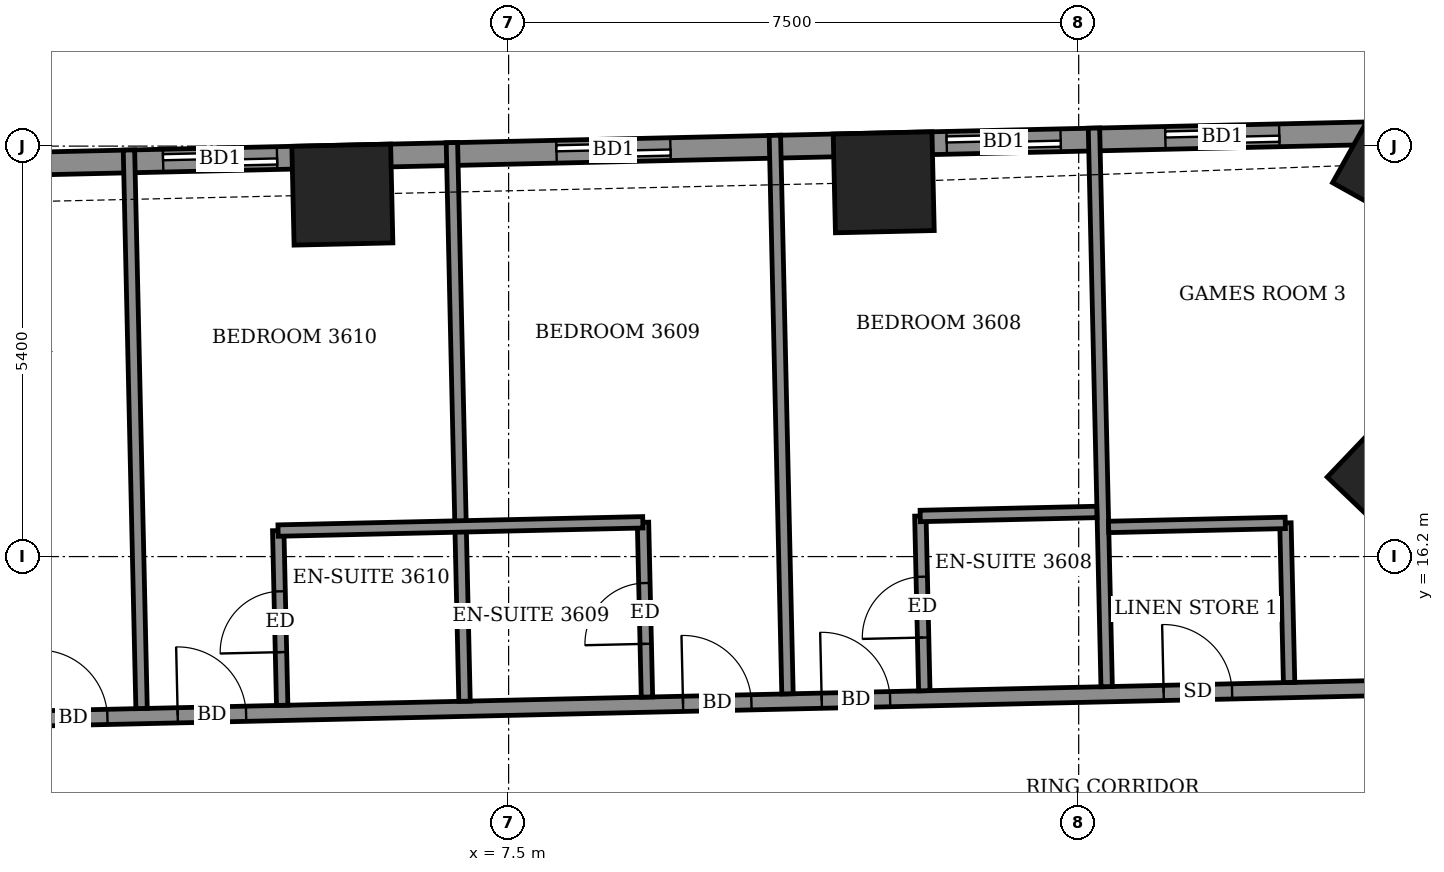
"""IFC4 building model, lengths in metres.
Left out: names, types, materials, properties, quantities, classifications, styles, units other than length and angle.
Written with IfcOpenShell. Run it as: python <this file> out.ifc"""

import sys

from ifc_helpers import new_model, si_unit, direction, frame, frame_2d, origin, origin_2d, place, context, subcontext, project, spatial, rectangle, extrude, element, fill, save


model = new_model("IFC4")
c1 = context("Model", 3, precision=1e-05, world=origin(), true_north=direction((0.0, 1.0)))
c2 = subcontext(c1, "Body", "Model", "MODEL_VIEW")
j1 = project(units=[si_unit("LENGTHUNIT", "METRE"), si_unit("PLANEANGLEUNIT", "RADIAN")], contexts=[c1])
p1 = place(None, origin())
s1 = spatial("IfcSite", under=j1, at=p1, CompositionType="ELEMENT")
p2 = place(p1, origin())
s2 = spatial("IfcBuilding", under=s1, at=p2, CompositionType="ELEMENT")
p3 = place(p2, frame((0.0, 0.0, 144.5)))
s3 = spatial("IfcBuildingStorey", under=s2, at=p3, CompositionType="ELEMENT", Elevation=144.5)
for number, where, z_axis, x_axis in (
    (1, (19.189, 17.267, -0.55), (0.0, 0.0, 1.0), (-0.723, 0.691, 0.0)),
    (2, (19.225, 21.369, -0.55), (0.0, 0.0, 1.0), (-0.873, 0.488, 0.0)),
    (3, (12.435, 21.124, -0.55), (0.0, 0.0, 1.0), (-1.0, -0.023, 0.0)),
    (4, (5.313, 20.962, -0.55), (0.0, 0.0, 1.0), (-1.0, -0.023, 0.0)),
):
    element("IfcColumn", number, at=place(p3, frame(where, z_axis=z_axis, x_axis=x_axis)), inside=s3, PredefinedType="COLUMN", context=c2, shape_type="SweptSolid", body=[
        extrude(rectangle(XDim=1.3, YDim=1.3, at=origin_2d()), origin(), (0.0, 0.0, 1.0), 3.6),
    ])
p4 = place(p3, frame((19.396, 21.782, 0.0), z_axis=(0.0, 0.0, 1.0), x_axis=(-0.999742636707, -0.022686126826, 0.0)))
e5 = element("IfcWall", 5, at=p4, inside=s3, PredefinedType="SOLIDWALL", context=c2, shape_type="SweptSolid", body=[
    extrude(rectangle(XDim=42.444, YDim=0.3, at=frame_2d((21.222, 0.0))), origin(), (0.0, 0.0, 1.0), 3.05),
])
p5 = place(p4, frame((1.757, 0.0, 0.0)))
e6 = element("IfcOpeningElement", 6, at=p5, cuts=e5, PredefinedType="OPENING", context=c2, shape_type="SweptSolid", body=[
    extrude(rectangle(XDim=1.5, YDim=2.4, at=frame_2d((0.75, 1.2))), frame((0.0, 0.16, 0.0), z_axis=(0.0, -1.0, 0.0), x_axis=(1.0, 0.0, 0.0)), (0.0, 0.0, 1.0), 0.32),
])
p6 = place(p4, frame((4.634, 0.0, 0.0)))
e7 = element("IfcOpeningElement", 7, at=p6, cuts=e5, PredefinedType="OPENING", context=c2, shape_type="SweptSolid", body=[
    extrude(rectangle(XDim=1.5, YDim=2.4, at=frame_2d((0.75, 1.2))), frame((0.0, 0.16, 0.0), z_axis=(0.0, -1.0, 0.0), x_axis=(1.0, 0.0, 0.0)), (0.0, 0.0, 1.0), 0.32),
])
p7 = place(p4, frame((9.769, 0.0, 0.0)))
e8 = element("IfcOpeningElement", 8, at=p7, cuts=e5, PredefinedType="OPENING", context=c2, shape_type="SweptSolid", body=[
    extrude(rectangle(XDim=1.5, YDim=2.4, at=frame_2d((0.75, 1.2))), frame((0.0, 0.16, 0.0), z_axis=(0.0, -1.0, 0.0), x_axis=(1.0, 0.0, 0.0)), (0.0, 0.0, 1.0), 0.32),
])
p8 = place(p4, frame((14.946, 0.0, 0.0)))
e9 = element("IfcOpeningElement", 9, at=p8, cuts=e5, PredefinedType="OPENING", context=c2, shape_type="SweptSolid", body=[
    extrude(rectangle(XDim=1.5, YDim=2.4, at=frame_2d((0.75, 1.2))), frame((0.0, 0.16, 0.0), z_axis=(0.0, -1.0, 0.0), x_axis=(1.0, 0.0, 0.0)), (0.0, 0.0, 1.0), 0.32),
])
p9 = place(p4, frame((18.108, 0.0, 0.0)))
e10 = element("IfcOpeningElement", 10, at=p9, cuts=e5, PredefinedType="OPENING", context=c2, shape_type="SweptSolid", body=[
    extrude(rectangle(XDim=1.5, YDim=2.4, at=frame_2d((0.75, 1.2))), frame((0.0, 0.16, 0.0), z_axis=(0.0, -1.0, 0.0), x_axis=(1.0, 0.0, 0.0)), (0.0, 0.0, 1.0), 0.32),
])
p10 = place(p4, frame((22.733, 0.0, 0.0)))
e11 = element("IfcOpeningElement", 11, at=p10, cuts=e5, PredefinedType="OPENING", context=c2, shape_type="SweptSolid", body=[
    extrude(rectangle(XDim=1.5, YDim=2.4, at=frame_2d((0.75, 1.2))), frame((0.0, 0.16, 0.0), z_axis=(0.0, -1.0, 0.0), x_axis=(1.0, 0.0, 0.0)), (0.0, 0.0, 1.0), 0.32),
])
p11 = place(p4, frame((25.895, 0.0, 0.0)))
e12 = element("IfcOpeningElement", 12, at=p11, cuts=e5, PredefinedType="OPENING", context=c2, shape_type="SweptSolid", body=[
    extrude(rectangle(XDim=1.5, YDim=2.4, at=frame_2d((0.75, 1.2))), frame((0.0, 0.16, 0.0), z_axis=(0.0, -1.0, 0.0), x_axis=(1.0, 0.0, 0.0)), (0.0, 0.0, 1.0), 0.32),
])
p12 = place(p4, frame((30.944, 0.0, 0.0)))
e13 = element("IfcOpeningElement", 13, at=p12, cuts=e5, PredefinedType="OPENING", context=c2, shape_type="SweptSolid", body=[
    extrude(rectangle(XDim=1.5, YDim=2.4, at=frame_2d((0.75, 1.2))), frame((0.0, 0.16, 0.0), z_axis=(0.0, -1.0, 0.0), x_axis=(1.0, 0.0, 0.0)), (0.0, 0.0, 1.0), 0.32),
])
p13 = place(p4, frame((36.232, 0.0, 0.0)))
e14 = element("IfcOpeningElement", 14, at=p13, cuts=e5, PredefinedType="OPENING", context=c2, shape_type="SweptSolid", body=[
    extrude(rectangle(XDim=1.5, YDim=2.4, at=frame_2d((0.75, 1.2))), frame((0.0, 0.16, 0.0), z_axis=(0.0, -1.0, 0.0), x_axis=(1.0, 0.0, 0.0)), (0.0, 0.0, 1.0), 0.32),
])
p14 = place(p4, frame((38.612, 0.0, 0.9)))
e15 = element("IfcOpeningElement", 15, at=p14, cuts=e5, PredefinedType="OPENING", context=c2, shape_type="SweptSolid", body=[
    extrude(rectangle(XDim=2.4, YDim=1.5, at=frame_2d((1.2, 0.75))), frame((0.0, 0.16, 0.0), z_axis=(0.0, -1.0, 0.0), x_axis=(1.0, 0.0, 0.0)), (0.0, 0.0, 1.0), 0.32),
])
p15 = place(p3, frame((16.679, 12.918, 0.0), z_axis=(0.0, 0.0, 1.0), x_axis=(0.999739057042, 0.022843332181, 0.0)))
e16 = element("IfcWall", 16, at=p15, inside=s3, PredefinedType="PARTITIONING", context=c2, shape_type="SweptSolid", body=[
    extrude(rectangle(XDim=5.867, YDim=0.2, at=frame_2d((2.934, 0.0))), origin(), (0.0, 0.0, 1.0), 3.05),
])
p16 = place(p15, frame((3.134, 0.0, 0.0)))
e17 = element("IfcOpeningElement", 17, at=p16, cuts=e16, PredefinedType="OPENING", context=c2, shape_type="SweptSolid", body=[
    extrude(rectangle(XDim=1.0, YDim=2.1, at=frame_2d((0.5, 1.05))), frame((0.0, 0.11, 0.0), z_axis=(0.0, -1.0, 0.0), x_axis=(1.0, 0.0, 0.0)), (0.0, 0.0, 1.0), 0.22),
])
p17 = place(p3, frame((-26.421, 13.441, 0.0), z_axis=(0.0, 0.0, 1.0), x_axis=(0.999742754064, 0.022680954485, 0.0)))
e18 = element("IfcWall", 18, at=p17, inside=s3, PredefinedType="PARTITIONING", context=c2, shape_type="SweptSolid", body=[
    extrude(rectangle(XDim=48.945, YDim=0.2, at=frame_2d((24.472, 0.0))), origin(), (0.0, 0.0, 1.0), 3.05),
])
p18 = place(p17, frame((46.772, 0.0, 0.0)))
e19 = element("IfcOpeningElement", 19, at=p18, cuts=e18, PredefinedType="OPENING", context=c2, shape_type="SweptSolid", body=[
    extrude(rectangle(XDim=1.0, YDim=2.1, at=frame_2d((0.5, 1.05))), frame((0.0, 0.11, 0.0), z_axis=(0.0, -1.0, 0.0), x_axis=(1.0, 0.0, 0.0)), (0.0, 0.0, 1.0), 0.22),
])
p19 = place(p17, frame((42.55, 0.0, 0.0)))
e20 = element("IfcOpeningElement", 20, at=p19, cuts=e18, PredefinedType="OPENING", context=c2, shape_type="SweptSolid", body=[
    extrude(rectangle(XDim=0.9, YDim=2.1, at=frame_2d((0.45, 1.05))), frame((0.0, 0.11, 0.0), z_axis=(0.0, -1.0, 0.0), x_axis=(1.0, 0.0, 0.0)), (0.0, 0.0, 1.0), 0.22),
])
p20 = place(p17, frame((38.05, 0.0, 0.0)))
e21 = element("IfcOpeningElement", 21, at=p20, cuts=e18, PredefinedType="OPENING", context=c2, shape_type="SweptSolid", body=[
    extrude(rectangle(XDim=0.9, YDim=2.1, at=frame_2d((0.45, 1.05))), frame((0.0, 0.11, 0.0), z_axis=(0.0, -1.0, 0.0), x_axis=(1.0, 0.0, 0.0)), (0.0, 0.0, 1.0), 0.22),
])
p21 = place(p17, frame((36.225, 0.0, 0.0)))
e22 = element("IfcOpeningElement", 22, at=p21, cuts=e18, PredefinedType="OPENING", context=c2, shape_type="SweptSolid", body=[
    extrude(rectangle(XDim=0.9, YDim=2.1, at=frame_2d((0.45, 1.05))), frame((0.0, 0.11, 0.0), z_axis=(0.0, -1.0, 0.0), x_axis=(1.0, 0.0, 0.0)), (0.0, 0.0, 1.0), 0.22),
])
p22 = place(p17, frame((29.575, 0.0, 0.0)))
e23 = element("IfcOpeningElement", 23, at=p22, cuts=e18, PredefinedType="OPENING", context=c2, shape_type="SweptSolid", body=[
    extrude(rectangle(XDim=0.9, YDim=2.1, at=frame_2d((0.45, 1.05))), frame((0.0, 0.11, 0.0), z_axis=(0.0, -1.0, 0.0), x_axis=(1.0, 0.0, 0.0)), (0.0, 0.0, 1.0), 0.22),
])
p23 = place(p17, frame((27.75, 0.0, 0.0)))
e24 = element("IfcOpeningElement", 24, at=p23, cuts=e18, PredefinedType="OPENING", context=c2, shape_type="SweptSolid", body=[
    extrude(rectangle(XDim=0.9, YDim=2.1, at=frame_2d((0.45, 1.05))), frame((0.0, 0.11, 0.0), z_axis=(0.0, -1.0, 0.0), x_axis=(1.0, 0.0, 0.0)), (0.0, 0.0, 1.0), 0.22),
])
p24 = place(p17, frame((21.125, 0.0, 0.0)))
e25 = element("IfcOpeningElement", 25, at=p24, cuts=e18, PredefinedType="OPENING", context=c2, shape_type="SweptSolid", body=[
    extrude(rectangle(XDim=0.9, YDim=2.1, at=frame_2d((0.45, 1.05))), frame((0.0, 0.11, 0.0), z_axis=(0.0, -1.0, 0.0), x_axis=(1.0, 0.0, 0.0)), (0.0, 0.0, 1.0), 0.22),
])
p25 = place(p17, frame((19.275, 0.0, 0.0)))
e26 = element("IfcOpeningElement", 26, at=p25, cuts=e18, PredefinedType="OPENING", context=c2, shape_type="SweptSolid", body=[
    extrude(rectangle(XDim=0.9, YDim=2.1, at=frame_2d((0.45, 1.05))), frame((0.0, 0.11, 0.0), z_axis=(0.0, -1.0, 0.0), x_axis=(1.0, 0.0, 0.0)), (0.0, 0.0, 1.0), 0.22),
])
p26 = place(p17, frame((12.65, 0.0, 0.0)))
e27 = element("IfcOpeningElement", 27, at=p26, cuts=e18, PredefinedType="OPENING", context=c2, shape_type="SweptSolid", body=[
    extrude(rectangle(XDim=0.9, YDim=2.1, at=frame_2d((0.45, 1.05))), frame((0.0, 0.11, 0.0), z_axis=(0.0, -1.0, 0.0), x_axis=(1.0, 0.0, 0.0)), (0.0, 0.0, 1.0), 0.22),
])
p27 = place(p17, frame((10.8, 0.0, 0.0)))
e28 = element("IfcOpeningElement", 28, at=p27, cuts=e18, PredefinedType="OPENING", context=c2, shape_type="SweptSolid", body=[
    extrude(rectangle(XDim=0.9, YDim=2.1, at=frame_2d((0.45, 1.05))), frame((0.0, 0.11, 0.0), z_axis=(0.0, -1.0, 0.0), x_axis=(1.0, 0.0, 0.0)), (0.0, 0.0, 1.0), 0.22),
])
p28 = place(p17, frame((1.55, 0.0, 0.0)))
e29 = element("IfcOpeningElement", 29, at=p28, cuts=e18, PredefinedType="OPENING", context=c2, shape_type="SweptSolid", body=[
    extrude(rectangle(XDim=1.0, YDim=2.1, at=frame_2d((0.5, 1.05))), frame((0.0, 0.11, 0.0), z_axis=(0.0, -1.0, 0.0), x_axis=(1.0, 0.0, 0.0)), (0.0, 0.0, 1.0), 0.22),
])
p29 = place(p17, frame((6.25, 0.0, 0.0)))
e30 = element("IfcOpeningElement", 30, at=p29, cuts=e18, PredefinedType="OPENING", context=c2, shape_type="SweptSolid", body=[
    extrude(rectangle(XDim=0.9, YDim=2.1, at=frame_2d((0.45, 1.05))), frame((0.0, 0.11, 0.0), z_axis=(0.0, -1.0, 0.0), x_axis=(1.0, 0.0, 0.0)), (0.0, 0.0, 1.0), 0.22),
])
p30 = place(p3, frame((2.671, 14.201, 0.0), z_axis=(0.0, 0.0, 1.0), x_axis=(-0.022587099398, 0.999744878927, 0.0)))
e31 = element("IfcWall", 31, at=p30, inside=s3, PredefinedType="PARTITIONING", context=c2, shape_type="SweptSolid", body=[
    extrude(rectangle(XDim=7.35, YDim=0.15, at=frame_2d((3.675, 0.0))), origin(), (0.0, 0.0, 1.0), 2.55),
])
p31 = place(p3, frame((4.521, 14.243, 0.0), z_axis=(0.0, 0.0, 1.0), x_axis=(-0.022612884682, 0.999744296031, 0.0)))
e32 = element("IfcWall", 32, at=p31, inside=s3, PredefinedType="PARTITIONING", context=c2, shape_type="SweptSolid", body=[
    extrude(rectangle(XDim=2.3, YDim=0.15, at=frame_2d((1.15, 0.0))), origin(), (0.0, 0.0, 1.0), 3.05),
])
p32 = place(p31, frame((0.7, 0.0, 0.0)))
e33 = element("IfcOpeningElement", 33, at=p32, cuts=e32, PredefinedType="OPENING", context=c2, shape_type="SweptSolid", body=[
    extrude(rectangle(XDim=0.8, YDim=2.1, at=frame_2d((0.4, 1.05))), frame((0.0, 0.085, 0.0), z_axis=(0.0, -1.0, 0.0), x_axis=(1.0, 0.0, 0.0)), (0.0, 0.0, 1.0), 0.17),
])
p33 = place(p3, frame((6.92, 14.297, 0.0), z_axis=(0.0, 0.0, 1.0), x_axis=(-0.022584849415, 0.999744929758, 0.0)))
e34 = element("IfcWall", 34, at=p33, inside=s3, PredefinedType="PARTITIONING", context=c2, shape_type="SweptSolid", body=[
    extrude(rectangle(XDim=7.351, YDim=0.15, at=frame_2d((3.675, 0.0))), origin(), (0.0, 0.0, 1.0), 2.55),
])
p34 = place(p3, frame((9.32, 14.352, 0.0), z_axis=(0.0, 0.0, 1.0), x_axis=(-0.022615284993, 0.999744241736, 0.0)))
e35 = element("IfcWall", 35, at=p34, inside=s3, PredefinedType="PARTITIONING", context=c2, shape_type="SweptSolid", body=[
    extrude(rectangle(XDim=2.299, YDim=0.15, at=frame_2d((1.15, 0.0))), origin(), (0.0, 0.0, 1.0), 3.05),
])
p35 = place(p34, frame((0.7, 0.0, 0.0)))
e36 = element("IfcOpeningElement", 36, at=p35, cuts=e35, PredefinedType="OPENING", context=c2, shape_type="SweptSolid", body=[
    extrude(rectangle(XDim=0.8, YDim=2.1, at=frame_2d((0.4, 1.05))), frame((0.0, 0.085, 0.0), z_axis=(0.0, -1.0, 0.0), x_axis=(1.0, 0.0, 0.0)), (0.0, 0.0, 1.0), 0.17),
])
p36 = place(p3, frame((11.169, 14.394, 0.0), z_axis=(0.0, 0.0, 1.0), x_axis=(-0.022587849492, 0.99974486198, 0.0)))
e37 = element("IfcWall", 37, at=p36, inside=s3, PredefinedType="PARTITIONING", context=c2, shape_type="SweptSolid", body=[
    extrude(rectangle(XDim=7.35, YDim=0.15, at=frame_2d((3.675, 0.0))), origin(), (0.0, 0.0, 1.0), 2.55),
])
p37 = place(p3, frame((12.969, 14.435, 0.0), z_axis=(0.0, 0.0, 1.0), x_axis=(-0.022615284993, 0.999744241736, 0.0)))
e38 = element("IfcWall", 38, at=p37, inside=s3, PredefinedType="PARTITIONING", context=c2, shape_type="SweptSolid", body=[
    extrude(rectangle(XDim=2.299, YDim=0.15, at=frame_2d((1.15, 0.0))), origin(), (0.0, 0.0, 1.0), 3.05),
])
p38 = place(p37, frame((0.7, 0.0, 0.0)))
e39 = element("IfcOpeningElement", 39, at=p38, cuts=e38, PredefinedType="OPENING", context=c2, shape_type="SweptSolid", body=[
    extrude(rectangle(XDim=0.8, YDim=2.1, at=frame_2d((0.4, 1.05))), frame((0.0, 0.085, 0.0), z_axis=(0.0, -1.0, 0.0), x_axis=(1.0, 0.0, 0.0)), (0.0, 0.0, 1.0), 0.17),
])
p39 = place(p3, frame((15.368, 14.489, 0.0), z_axis=(0.0, 0.0, 1.0), x_axis=(-0.022720650804, 0.999741852694, 0.0)))
e40 = element("IfcWall", 40, at=p39, inside=s3, PredefinedType="PARTITIONING", context=c2, shape_type="SweptSolid", body=[
    extrude(rectangle(XDim=7.35, YDim=0.15, at=frame_2d((3.675, 0.0))), origin(), (0.0, 0.0, 1.0), 2.55),
])
p40 = place(p3, frame((17.768, 14.544, 0.0), z_axis=(0.0, 0.0, 1.0), x_axis=(-0.022906293375, 0.999737616439, 0.0)))
e41 = element("IfcWall", 41, at=p40, inside=s3, PredefinedType="PARTITIONING", context=c2, shape_type="SweptSolid", body=[
    extrude(rectangle(XDim=2.1, YDim=0.15, at=frame_2d((1.05, 0.0))), origin(), (0.0, 0.0, 1.0), 3.05),
])
p41 = place(p3, frame((15.394, 16.59, 0.0), z_axis=(0.0, 0.0, 1.0), x_axis=(0.999740260747, 0.02279059109, 0.0)))
e42 = element("IfcWall", 42, at=p41, inside=s3, PredefinedType="PARTITIONING", context=c2, shape_type="SweptSolid", body=[
    extrude(rectangle(XDim=2.324, YDim=0.15, at=frame_2d((1.162, 0.0))), origin(), (0.0, 0.0, 1.0), 3.05),
])
p42 = place(p3, frame((4.467, 16.542, 0.0), z_axis=(0.0, 0.0, 1.0), x_axis=(0.999742701292, 0.022683280499, 0.0)))
e43 = element("IfcWall", 43, at=p42, inside=s3, PredefinedType="PARTITIONING", context=c2, shape_type="SweptSolid", body=[
    extrude(rectangle(XDim=4.8, YDim=0.15, at=frame_2d((2.4, 0.0))), origin(), (0.0, 0.0, 1.0), 3.05),
])
p43 = place(p3, frame((12.915, 16.734, 0.0), z_axis=(0.0, 0.0, 1.0), x_axis=(0.999737862264, 0.022895561926, 0.0)))
e44 = element("IfcWall", 44, at=p43, inside=s3, PredefinedType="PARTITIONING", context=c2, shape_type="SweptSolid", body=[
    extrude(rectangle(XDim=2.324, YDim=0.15, at=frame_2d((1.162, 0.0))), origin(), (0.0, 0.0, 1.0), 3.05),
])
p44 = place(p5, origin())
e45 = element("IfcDoor", 45, at=p44, inside=s3, OperationType="SLIDING_TO_LEFT", PredefinedType="DOOR", context=c2, shape_type="SweptSolid", body=[
    extrude(rectangle(XDim=1.5, YDim=2.4, at=frame_2d((0.75, 1.2))), frame((0.0, 0.025, 0.0), z_axis=(0.0, -1.0, 0.0), x_axis=(1.0, 0.0, 0.0)), (0.0, 0.0, 1.0), 0.05),
])
fill(e6, e45)
p45 = place(p6, origin())
e46 = element("IfcDoor", 46, at=p45, inside=s3, OperationType="SLIDING_TO_LEFT", PredefinedType="DOOR", context=c2, shape_type="SweptSolid", body=[
    extrude(rectangle(XDim=1.5, YDim=2.4, at=frame_2d((0.75, 1.2))), frame((0.0, 0.025, 0.0), z_axis=(0.0, -1.0, 0.0), x_axis=(1.0, 0.0, 0.0)), (0.0, 0.0, 1.0), 0.05),
])
fill(e7, e46)
p46 = place(p7, origin())
e47 = element("IfcDoor", 47, at=p46, inside=s3, OperationType="SLIDING_TO_LEFT", PredefinedType="DOOR", context=c2, shape_type="SweptSolid", body=[
    extrude(rectangle(XDim=1.5, YDim=2.4, at=frame_2d((0.75, 1.2))), frame((0.0, 0.025, 0.0), z_axis=(0.0, -1.0, 0.0), x_axis=(1.0, 0.0, 0.0)), (0.0, 0.0, 1.0), 0.05),
])
fill(e8, e47)
p47 = place(p8, origin())
e48 = element("IfcDoor", 48, at=p47, inside=s3, OperationType="SLIDING_TO_LEFT", PredefinedType="DOOR", context=c2, shape_type="SweptSolid", body=[
    extrude(rectangle(XDim=1.5, YDim=2.4, at=frame_2d((0.75, 1.2))), frame((0.0, 0.025, 0.0), z_axis=(0.0, -1.0, 0.0), x_axis=(1.0, 0.0, 0.0)), (0.0, 0.0, 1.0), 0.05),
])
fill(e9, e48)
p48 = place(p19, origin())
e49 = element("IfcDoor", 49, at=p48, inside=s3, OperationType="SINGLE_SWING_LEFT", PredefinedType="DOOR", context=c2, shape_type="SweptSolid", body=[
    extrude(rectangle(XDim=0.9, YDim=2.1, at=frame_2d((0.45, 1.05))), frame((0.0, 0.025, 0.0), z_axis=(0.0, -1.0, 0.0), x_axis=(1.0, 0.0, 0.0)), (0.0, 0.0, 1.0), 0.05),
])
fill(e20, e49)
p49 = place(p20, origin())
e50 = element("IfcDoor", 50, at=p49, inside=s3, OperationType="SINGLE_SWING_RIGHT", PredefinedType="DOOR", context=c2, shape_type="SweptSolid", body=[
    extrude(rectangle(XDim=0.9, YDim=2.1, at=frame_2d((0.45, 1.05))), frame((0.0, 0.025, 0.0), z_axis=(0.0, -1.0, 0.0), x_axis=(1.0, 0.0, 0.0)), (0.0, 0.0, 1.0), 0.05),
])
fill(e21, e50)
p50 = place(p38, origin())
e51 = element("IfcDoor", 51, at=p50, inside=s3, OperationType="SINGLE_SWING_RIGHT", PredefinedType="DOOR", context=c2, shape_type="SweptSolid", body=[
    extrude(rectangle(XDim=0.8, YDim=2.1, at=frame_2d((0.4, 1.05))), frame((0.0, 0.025, 0.0), z_axis=(0.0, -1.0, 0.0), x_axis=(1.0, 0.0, 0.0)), (0.0, 0.0, 1.0), 0.05),
])
fill(e39, e51)
p51 = place(p21, origin())
e52 = element("IfcDoor", 52, at=p51, inside=s3, OperationType="SINGLE_SWING_LEFT", PredefinedType="DOOR", context=c2, shape_type="SweptSolid", body=[
    extrude(rectangle(XDim=0.9, YDim=2.1, at=frame_2d((0.45, 1.05))), frame((0.0, 0.025, 0.0), z_axis=(0.0, -1.0, 0.0), x_axis=(1.0, 0.0, 0.0)), (0.0, 0.0, 1.0), 0.05),
])
fill(e22, e52)
p52 = place(p35, origin())
e53 = element("IfcDoor", 53, at=p52, inside=s3, OperationType="SINGLE_SWING_LEFT", PredefinedType="DOOR", context=c2, shape_type="SweptSolid", body=[
    extrude(rectangle(XDim=0.8, YDim=2.1, at=frame_2d((0.4, 1.05))), frame((0.0, 0.025, 0.0), z_axis=(0.0, -1.0, 0.0), x_axis=(1.0, 0.0, 0.0)), (0.0, 0.0, 1.0), 0.05),
])
fill(e36, e53)
p53 = place(p22, origin())
e54 = element("IfcDoor", 54, at=p53, inside=s3, OperationType="SINGLE_SWING_RIGHT", PredefinedType="DOOR", context=c2, shape_type="SweptSolid", body=[
    extrude(rectangle(XDim=0.9, YDim=2.1, at=frame_2d((0.45, 1.05))), frame((0.0, 0.025, 0.0), z_axis=(0.0, -1.0, 0.0), x_axis=(1.0, 0.0, 0.0)), (0.0, 0.0, 1.0), 0.05),
])
fill(e23, e54)
p54 = place(p32, origin())
e55 = element("IfcDoor", 55, at=p54, inside=s3, OperationType="SINGLE_SWING_RIGHT", PredefinedType="DOOR", context=c2, shape_type="SweptSolid", body=[
    extrude(rectangle(XDim=0.8, YDim=2.1, at=frame_2d((0.4, 1.05))), frame((0.0, 0.025, 0.0), z_axis=(0.0, -1.0, 0.0), x_axis=(1.0, 0.0, 0.0)), (0.0, 0.0, 1.0), 0.05),
])
fill(e33, e55)
p55 = place(p23, origin())
e56 = element("IfcDoor", 56, at=p55, inside=s3, OperationType="SINGLE_SWING_LEFT", PredefinedType="DOOR", context=c2, shape_type="SweptSolid", body=[
    extrude(rectangle(XDim=0.9, YDim=2.1, at=frame_2d((0.45, 1.05))), frame((0.0, 0.025, 0.0), z_axis=(0.0, -1.0, 0.0), x_axis=(1.0, 0.0, 0.0)), (0.0, 0.0, 1.0), 0.05),
])
fill(e24, e56)
save(model, sys.argv[1])
